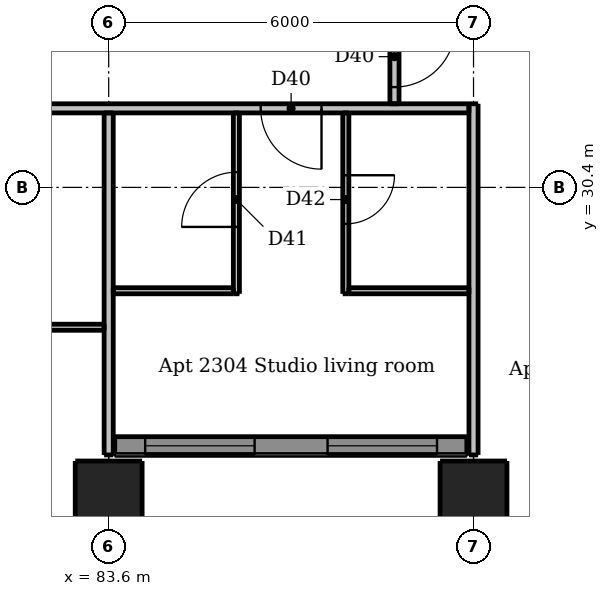
"""IFC4 building model, lengths in metres.
Left out: names, types, materials, properties, quantities, classifications, styles, units other than length and angle.
Written with IfcOpenShell. Run it as: python <this file> out.ifc"""

import sys

from ifc_helpers import new_model, si_unit, direction, frame, frame_2d, origin, origin_2d, place, context, subcontext, project, spatial, rectangle, extrude, element, fill, save


model = new_model("IFC4")
c1 = context("Model", 3, precision=1e-05, world=origin(), true_north=direction((0.0, 1.0)))
c2 = subcontext(c1, "Body", "Model", "MODEL_VIEW")
j1 = project(units=[si_unit("LENGTHUNIT", "METRE"), si_unit("PLANEANGLEUNIT", "RADIAN")], contexts=[c1])
p1 = place(None, origin())
s1 = spatial("IfcSite", under=j1, at=p1, CompositionType="ELEMENT")
p2 = place(p1, origin())
s2 = spatial("IfcBuilding", under=s1, at=p2, CompositionType="ELEMENT")
p3 = place(p2, frame((0.0, 0.0, 88.6)))
s3 = spatial("IfcBuildingStorey", under=s2, at=p3, CompositionType="ELEMENT", Elevation=88.6)
for number, where, z_axis, x_axis in (
    (1, (83.6, 25.35, 0.0), (0.0, 0.0, 1.0), (1.0, 0.0, 0.0)),
    (2, (89.6, 25.35, 0.0), (0.0, 0.0, 1.0), (1.0, 0.0, 0.0)),
):
    element("IfcColumn", number, at=place(p3, frame(where, z_axis=z_axis, x_axis=x_axis)), inside=s3, PredefinedType="COLUMN", context=c2, shape_type="SweptSolid", body=[
        extrude(rectangle(XDim=1.1, YDim=1.1, at=origin_2d()), origin(), (0.0, 0.0, 1.0), 3.05),
    ])
p4 = place(p3, frame((83.7, 26.15, 0.0), z_axis=(0.0, 0.0, 1.0), x_axis=(1.0, 0.0, 0.0)))
e3 = element("IfcWall", 3, at=p4, inside=s3, PredefinedType="SOLIDWALL", context=c2, shape_type="SweptSolid", body=[
    extrude(rectangle(XDim=5.79, YDim=0.3, at=frame_2d((2.895, 0.0))), origin(), (0.0, 0.0, 1.0), 3.05),
])
p5 = place(p4, frame((0.5, 0.0, 0.15)))
e4 = element("IfcOpeningElement", 4, at=p5, cuts=e3, PredefinedType="OPENING", context=c2, shape_type="SweptSolid", body=[
    extrude(rectangle(XDim=1.8, YDim=2.1, at=frame_2d((0.9, 1.05))), frame((0.0, 0.16, 0.0), z_axis=(0.0, -1.0, 0.0), x_axis=(1.0, 0.0, 0.0)), (0.0, 0.0, 1.0), 0.32),
])
p6 = place(p4, frame((3.5, 0.0, 0.15)))
e5 = element("IfcOpeningElement", 5, at=p6, cuts=e3, PredefinedType="OPENING", context=c2, shape_type="SweptSolid", body=[
    extrude(rectangle(XDim=1.8, YDim=2.1, at=frame_2d((0.9, 1.05))), frame((0.0, 0.16, 0.0), z_axis=(0.0, -1.0, 0.0), x_axis=(1.0, 0.0, 0.0)), (0.0, 0.0, 1.0), 0.32),
])
p7 = place(p3, frame((85.7, 28.65, 0.0), z_axis=(0.0, 0.0, 1.0), x_axis=(0.0, 1.0, 0.0)))
e6 = element("IfcWall", 6, at=p7, inside=s3, PredefinedType="PARTITIONING", context=c2, shape_type="SweptSolid", body=[
    extrude(rectangle(XDim=2.975, YDim=0.1, at=frame_2d((1.488, 0.0))), origin(), (0.0, 0.0, 1.0), 3.05),
])
p8 = place(p7, frame((1.1, 0.0, 0.0)))
e7 = element("IfcOpeningElement", 7, at=p8, cuts=e6, PredefinedType="OPENING", context=c2, shape_type="SweptSolid", body=[
    extrude(rectangle(XDim=0.9, YDim=2.1, at=frame_2d((0.45, 1.05))), frame((0.0, 0.06, 0.0), z_axis=(0.0, -1.0, 0.0), x_axis=(1.0, 0.0, 0.0)), (0.0, 0.0, 1.0), 0.12),
])
p9 = place(p3, frame((87.5, 31.625, 0.0), z_axis=(0.0, 0.0, 1.0), x_axis=(0.0, -1.0, 0.0)))
e8 = element("IfcWall", 8, at=p9, inside=s3, PredefinedType="PARTITIONING", context=c2, shape_type="SweptSolid", body=[
    extrude(rectangle(XDim=2.975, YDim=0.1, at=frame_2d((1.488, 0.0))), origin(), (0.0, 0.0, 1.0), 3.05),
])
p10 = place(p9, frame((1.025, 0.0, 0.0)))
e9 = element("IfcOpeningElement", 9, at=p10, cuts=e8, PredefinedType="OPENING", context=c2, shape_type="SweptSolid", body=[
    extrude(rectangle(XDim=0.8, YDim=2.1, at=frame_2d((0.4, 1.05))), frame((0.0, 0.06, 0.0), z_axis=(0.0, -1.0, 0.0), x_axis=(1.0, 0.0, 0.0)), (0.0, 0.0, 1.0), 0.12),
])
for number, where, z_axis, x_axis in (
    (10, (83.675, 28.7, 0.0), (0.0, 0.0, 1.0), (1.0, 0.0, 0.0)),
    (11, (87.55, 28.7, 0.0), (0.0, 0.0, 1.0), (1.0, 0.0, 0.0)),
    (12, (81.55, 28.1, 0.0), (0.0, 0.0, 1.0), (1.0, 0.0, 0.0)),
):
    element("IfcWall", number, at=place(p3, frame(where, z_axis=z_axis, x_axis=x_axis)), inside=s3, PredefinedType="PARTITIONING", context=c2, shape_type="SweptSolid", body=[
        extrude(rectangle(XDim=1.975, YDim=0.1, at=frame_2d((0.987, 0.0))), origin(), (0.0, 0.0, 1.0), 3.05),
    ])
p11 = place(p3, frame((83.6, 26.0, 0.0), z_axis=(0.0, 0.0, 1.0), x_axis=(0.0, 1.0, 0.0)))
e13 = element("IfcWall", 13, at=p11, inside=s3, PredefinedType="PARTITIONING", context=c2, shape_type="SweptSolid", body=[
    extrude(rectangle(XDim=5.625, YDim=0.15, at=frame_2d((2.812, 0.0))), origin(), (0.0, 0.0, 1.0), 2.59),
])
p12 = place(p3, frame((88.3, 60.475, 0.0), z_axis=(0.0, 0.0, 1.0), x_axis=(0.0, -1.0, 0.0)))
e14 = element("IfcWall", 14, at=p12, inside=s3, PredefinedType="PARTITIONING", context=c2, shape_type="SweptSolid", body=[
    extrude(rectangle(XDim=28.7, YDim=0.15, at=frame_2d((14.35, 0.0))), origin(), (0.0, 0.0, 1.0), 3.05),
])
p13 = place(p12, frame((27.425, 0.0, 0.0)))
e15 = element("IfcOpeningElement", 15, at=p13, cuts=e14, PredefinedType="OPENING", context=c2, shape_type="SweptSolid", body=[
    extrude(rectangle(XDim=1.0, YDim=2.1, at=frame_2d((0.5, 1.05))), frame((0.0, 0.085, 0.0), z_axis=(0.0, -1.0, 0.0), x_axis=(1.0, 0.0, 0.0)), (0.0, 0.0, 1.0), 0.17),
])
p14 = place(p12, frame((17.575, 0.0, 0.0)))
e16 = element("IfcOpeningElement", 16, at=p14, cuts=e14, PredefinedType="OPENING", context=c2, shape_type="SweptSolid", body=[
    extrude(rectangle(XDim=1.0, YDim=2.1, at=frame_2d((0.5, 1.05))), frame((0.0, 0.085, 0.0), z_axis=(0.0, -1.0, 0.0), x_axis=(1.0, 0.0, 0.0)), (0.0, 0.0, 1.0), 0.17),
])
p15 = place(p12, frame((11.575, 0.0, 0.0)))
e17 = element("IfcOpeningElement", 17, at=p15, cuts=e14, PredefinedType="OPENING", context=c2, shape_type="SweptSolid", body=[
    extrude(rectangle(XDim=1.0, YDim=2.1, at=frame_2d((0.5, 1.05))), frame((0.0, 0.085, 0.0), z_axis=(0.0, -1.0, 0.0), x_axis=(1.0, 0.0, 0.0)), (0.0, 0.0, 1.0), 0.17),
])
p16 = place(p12, frame((3.775, 0.0, 0.0)))
e18 = element("IfcOpeningElement", 18, at=p16, cuts=e14, PredefinedType="OPENING", context=c2, shape_type="SweptSolid", body=[
    extrude(rectangle(XDim=1.0, YDim=2.1, at=frame_2d((0.5, 1.05))), frame((0.0, 0.085, 0.0), z_axis=(0.0, -1.0, 0.0), x_axis=(1.0, 0.0, 0.0)), (0.0, 0.0, 1.0), 0.17),
])
p17 = place(p3, frame((89.6, 26.0, 0.0), z_axis=(0.0, 0.0, 1.0), x_axis=(0.0, 1.0, 0.0)))
e19 = element("IfcWall", 19, at=p17, inside=s3, PredefinedType="PARTITIONING", context=c2, shape_type="SweptSolid", body=[
    extrude(rectangle(XDim=5.775, YDim=0.15, at=frame_2d((2.887, 0.0))), origin(), (0.0, 0.0, 1.0), 2.516),
])
p18 = place(p3, frame((89.525, 31.7, 0.0), z_axis=(0.0, 0.0, 1.0), x_axis=(-1.0, 0.0, 0.0)))
e20 = element("IfcWall", 20, at=p18, inside=s3, PredefinedType="PARTITIONING", context=c2, shape_type="SweptSolid", body=[
    extrude(rectangle(XDim=28.75, YDim=0.15, at=frame_2d((14.375, 0.0))), origin(), (0.0, 0.0, 1.0), 3.05),
])
p19 = place(p18, frame((25.875, 0.0, 0.0)))
e21 = element("IfcOpeningElement", 21, at=p19, cuts=e20, PredefinedType="OPENING", context=c2, shape_type="SweptSolid", body=[
    extrude(rectangle(XDim=1.0, YDim=2.1, at=frame_2d((0.5, 1.05))), frame((0.0, 0.085, 0.0), z_axis=(0.0, -1.0, 0.0), x_axis=(1.0, 0.0, 0.0)), (0.0, 0.0, 1.0), 0.17),
])
p20 = place(p18, frame((14.425, 0.0, 0.0)))
e22 = element("IfcOpeningElement", 22, at=p20, cuts=e20, PredefinedType="OPENING", context=c2, shape_type="SweptSolid", body=[
    extrude(rectangle(XDim=1.0, YDim=2.1, at=frame_2d((0.5, 1.05))), frame((0.0, 0.085, 0.0), z_axis=(0.0, -1.0, 0.0), x_axis=(1.0, 0.0, 0.0)), (0.0, 0.0, 1.0), 0.17),
])
p21 = place(p18, frame((8.425, 0.0, 0.0)))
e23 = element("IfcOpeningElement", 23, at=p21, cuts=e20, PredefinedType="OPENING", context=c2, shape_type="SweptSolid", body=[
    extrude(rectangle(XDim=1.0, YDim=2.1, at=frame_2d((0.5, 1.05))), frame((0.0, 0.085, 0.0), z_axis=(0.0, -1.0, 0.0), x_axis=(1.0, 0.0, 0.0)), (0.0, 0.0, 1.0), 0.17),
])
p22 = place(p18, frame((2.425, 0.0, 0.0)))
e24 = element("IfcOpeningElement", 24, at=p22, cuts=e20, PredefinedType="OPENING", context=c2, shape_type="SweptSolid", body=[
    extrude(rectangle(XDim=1.0, YDim=2.1, at=frame_2d((0.5, 1.05))), frame((0.0, 0.085, 0.0), z_axis=(0.0, -1.0, 0.0), x_axis=(1.0, 0.0, 0.0)), (0.0, 0.0, 1.0), 0.17),
])
p23 = place(p5, origin())
e25 = element("IfcWindow", 25, at=p23, inside=s3, PartitioningType="DOUBLE_PANEL_VERTICAL", PredefinedType="WINDOW", context=c2, shape_type="SweptSolid", body=[
    extrude(rectangle(XDim=1.8, YDim=2.1, at=frame_2d((0.9, 1.05))), frame((0.0, 0.03, 0.0), z_axis=(0.0, -1.0, 0.0), x_axis=(1.0, 0.0, 0.0)), (0.0, 0.0, 1.0), 0.06),
])
fill(e4, e25)
p24 = place(p6, origin())
e26 = element("IfcWindow", 26, at=p24, inside=s3, PartitioningType="DOUBLE_PANEL_VERTICAL", PredefinedType="WINDOW", context=c2, shape_type="SweptSolid", body=[
    extrude(rectangle(XDim=1.8, YDim=2.1, at=frame_2d((0.9, 1.05))), frame((0.0, 0.03, 0.0), z_axis=(0.0, -1.0, 0.0), x_axis=(1.0, 0.0, 0.0)), (0.0, 0.0, 1.0), 0.06),
])
fill(e5, e26)
p25 = place(p22, origin())
e27 = element("IfcDoor", 27, at=p25, inside=s3, OperationType="SINGLE_SWING_LEFT", PredefinedType="DOOR", context=c2, shape_type="SweptSolid", body=[
    extrude(rectangle(XDim=1.0, YDim=2.1, at=frame_2d((0.5, 1.05))), frame((0.0, 0.025, 0.0), z_axis=(0.0, -1.0, 0.0), x_axis=(1.0, 0.0, 0.0)), (0.0, 0.0, 1.0), 0.05),
])
fill(e24, e27)
p26 = place(p8, origin())
e28 = element("IfcDoor", 28, at=p26, inside=s3, OperationType="SINGLE_SWING_LEFT", PredefinedType="DOOR", context=c2, shape_type="SweptSolid", body=[
    extrude(rectangle(XDim=0.9, YDim=2.1, at=frame_2d((0.45, 1.05))), frame((0.0, 0.025, 0.0), z_axis=(0.0, -1.0, 0.0), x_axis=(1.0, 0.0, 0.0)), (0.0, 0.0, 1.0), 0.05),
])
fill(e7, e28)
p27 = place(p10, origin())
e29 = element("IfcDoor", 29, at=p27, inside=s3, OperationType="SINGLE_SWING_LEFT", PredefinedType="DOOR", context=c2, shape_type="SweptSolid", body=[
    extrude(rectangle(XDim=0.8, YDim=2.1, at=frame_2d((0.4, 1.05))), frame((0.0, 0.025, 0.0), z_axis=(0.0, -1.0, 0.0), x_axis=(1.0, 0.0, 0.0)), (0.0, 0.0, 1.0), 0.05),
])
fill(e9, e29)
p28 = place(p13, origin())
e30 = element("IfcDoor", 30, at=p28, inside=s3, OperationType="SINGLE_SWING_LEFT", PredefinedType="DOOR", context=c2, shape_type="SweptSolid", body=[
    extrude(rectangle(XDim=1.0, YDim=2.1, at=frame_2d((0.5, 1.05))), frame((0.0, 0.025, 0.0), z_axis=(0.0, -1.0, 0.0), x_axis=(1.0, 0.0, 0.0)), (0.0, 0.0, 1.0), 0.05),
])
fill(e15, e30)
save(model, sys.argv[1])
